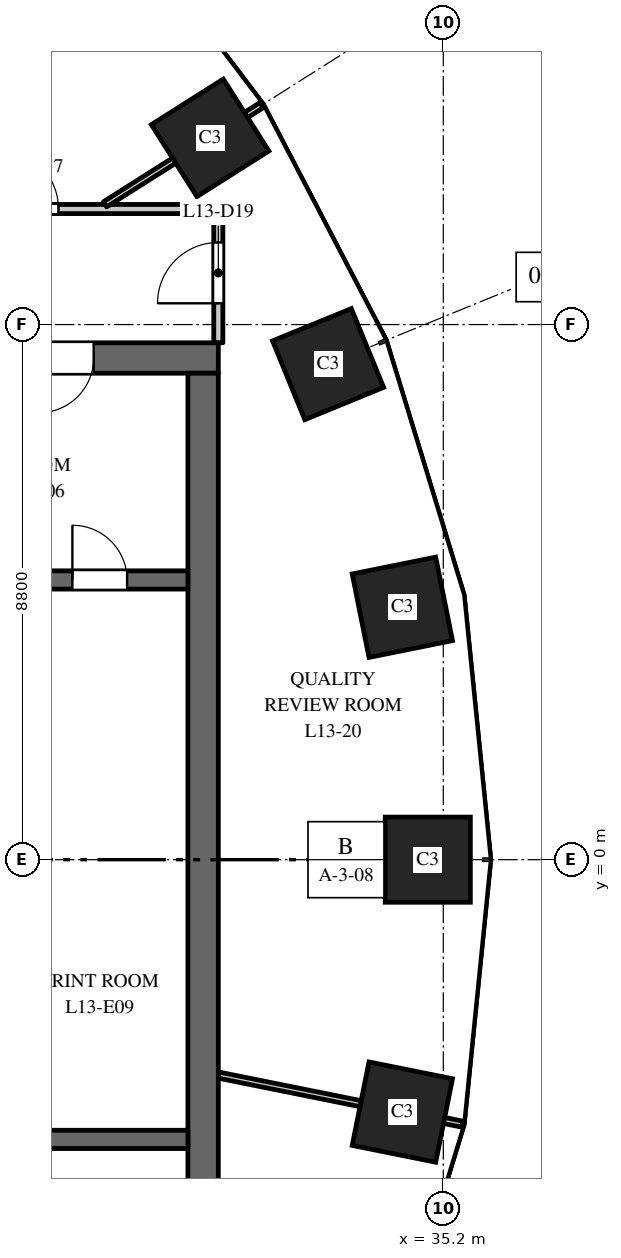
"""IFC4 building model, lengths in metres.
Left out: names, types, materials, properties, quantities, classifications, styles, units other than length and angle.
Written with IfcOpenShell. Run it as: python <this file> out.ifc"""

import sys

from ifc_helpers import new_model, si_unit, direction, frame, frame_2d, origin, origin_2d, place, context, subcontext, project, spatial, rectangle, extrude, element, fill, save


model = new_model("IFC4")
c1 = context("Model", 3, precision=1e-05, world=origin(), true_north=direction((0.0, 1.0)))
c2 = subcontext(c1, "Body", "Model", "MODEL_VIEW")
j1 = project(units=[si_unit("LENGTHUNIT", "METRE"), si_unit("PLANEANGLEUNIT", "RADIAN")], contexts=[c1])
p1 = place(None, origin())
s1 = spatial("IfcSite", under=j1, at=p1, CompositionType="ELEMENT")
p2 = place(p1, origin())
s2 = spatial("IfcBuilding", under=s1, at=p2, CompositionType="ELEMENT")
p3 = place(p2, frame((0.0, 0.0, 62.5)))
s3 = spatial("IfcBuildingStorey", under=s2, at=p3, CompositionType="ELEMENT", Elevation=62.5)
for number, where, z_axis, x_axis in (
    (1, (34.945, 0.0, 0.0), (0.0, 0.0, 1.0), (0.0, 1.0, 0.0)),
    (2, (34.527, 4.151, 0.0), (0.0, 0.0, 1.0), (-0.197, 0.98, 0.0)),
    (3, (33.305, 8.149, 0.0), (0.0, 0.0, 1.0), (-0.379, 0.925, 0.0)),
    (4, (31.365, 11.871, 0.0), (0.0, 0.0, 1.0), (-0.535, 0.845, 0.0)),
    (5, (34.527, -4.151, 0.0), (0.0, 0.0, 1.0), (0.197, 0.98, 0.0)),
):
    element("IfcColumn", number, at=place(p3, frame(where, z_axis=z_axis, x_axis=x_axis)), inside=s3, PredefinedType="COLUMN", context=c2, shape_type="SweptSolid", body=[
        extrude(rectangle(XDim=1.4, YDim=1.4, at=origin_2d()), origin(), (0.0, 0.0, 1.0), 4.0),
    ])
p4 = place(p3, frame((16.5, 8.25, 0.0), z_axis=(0.0, 0.0, 1.0), x_axis=(1.0, 0.0, 0.0)))
e6 = element("IfcWall", 6, at=p4, inside=s3, PredefinedType="SHEAR", context=c2, shape_type="SweptSolid", body=[
    extrude(rectangle(XDim=15.0, YDim=0.5, at=frame_2d((7.5, 0.0))), origin(), (0.0, 0.0, 1.0), 3.7),
])
p5 = place(p4, frame((6.9, 0.0, 0.0)))
e7 = element("IfcOpeningElement", 7, at=p5, cuts=e6, PredefinedType="OPENING", context=c2, shape_type="SweptSolid", body=[
    extrude(rectangle(XDim=1.2, YDim=2.1, at=frame_2d((0.6, 1.05))), frame((0.0, 0.26, 0.0), z_axis=(0.0, -1.0, 0.0), x_axis=(1.0, 0.0, 0.0)), (0.0, 0.0, 1.0), 0.52),
])
p6 = place(p4, frame((12.05, 0.0, 0.0)))
e8 = element("IfcOpeningElement", 8, at=p6, cuts=e6, PredefinedType="OPENING", context=c2, shape_type="SweptSolid", body=[
    extrude(rectangle(XDim=0.9, YDim=2.1, at=frame_2d((0.45, 1.05))), frame((0.0, 0.26, 0.0), z_axis=(0.0, -1.0, 0.0), x_axis=(1.0, 0.0, 0.0)), (0.0, 0.0, 1.0), 0.52),
])
p7 = place(p3, frame((31.25, -8.0, 0.0), z_axis=(0.0, 0.0, 1.0), x_axis=(0.0, 1.0, 0.0)))
e9 = element("IfcWall", 9, at=p7, inside=s3, PredefinedType="SHEAR", context=c2, shape_type="SweptSolid", body=[
    extrude(rectangle(XDim=16.0, YDim=0.5, at=frame_2d((8.0, 0.0))), origin(), (0.0, 0.0, 1.0), 3.7),
])
p8 = place(p3, frame((24.9, 4.6, 0.0), z_axis=(0.0, 0.0, 1.0), x_axis=(1.0, 0.0, 0.0)))
e10 = element("IfcWall", 10, at=p8, inside=s3, PredefinedType="SHEAR", context=c2, shape_type="SweptSolid", body=[
    extrude(rectangle(XDim=6.1, YDim=0.3, at=frame_2d((3.05, 0.0))), origin(), (0.0, 0.0, 1.0), 3.7),
])
p9 = place(p8, frame((4.2, 0.0, 0.0)))
e11 = element("IfcOpeningElement", 11, at=p9, cuts=e10, PredefinedType="OPENING", context=c2, shape_type="SweptSolid", body=[
    extrude(rectangle(XDim=0.9, YDim=2.1, at=frame_2d((0.45, 1.05))), frame((0.0, 0.16, 0.0), z_axis=(0.0, -1.0, 0.0), x_axis=(1.0, 0.0, 0.0)), (0.0, 0.0, 1.0), 0.32),
])
p10 = place(p3, frame((24.9, -4.6, 0.0), z_axis=(0.0, 0.0, 1.0), x_axis=(1.0, 0.0, 0.0)))
e12 = element("IfcWall", 12, at=p10, inside=s3, PredefinedType="SHEAR", context=c2, shape_type="SweptSolid", body=[
    extrude(rectangle(XDim=6.1, YDim=0.3, at=frame_2d((3.05, 0.0))), origin(), (0.0, 0.0, 1.0), 3.7),
])
p11 = place(p3, frame((16.5, 10.7, 0.0), z_axis=(0.0, 0.0, 1.0), x_axis=(1.0, 0.0, 0.0)))
e13 = element("IfcWall", 13, at=p11, inside=s3, PredefinedType="PARTITIONING", context=c2, shape_type="SweptSolid", body=[
    extrude(rectangle(XDim=15.0, YDim=0.15, at=frame_2d((7.5, 0.0))), origin(), (0.0, 0.0, 1.0), 2.75),
])
p12 = place(p11, frame((11.371, 0.0, 0.0)))
e14 = element("IfcOpeningElement", 14, at=p12, cuts=e13, PredefinedType="OPENING", context=c2, shape_type="SweptSolid", body=[
    extrude(rectangle(XDim=1.0, YDim=2.1, at=frame_2d((0.5, 1.05))), frame((0.0, 0.085, 0.0), z_axis=(0.0, -1.0, 0.0), x_axis=(1.0, 0.0, 0.0)), (0.0, 0.0, 1.0), 0.17),
])
p13 = place(p3, frame((29.637, 10.777, 0.0), z_axis=(0.0, 0.0, 1.0), x_axis=(0.844810627195, 0.535065420467, 0.0)))
e15 = element("IfcWall", 15, at=p13, inside=s3, PredefinedType="PARTITIONING", context=c2, shape_type="SweptSolid", body=[
    extrude(rectangle(XDim=3.048, YDim=0.1, at=frame_2d((1.524, 0.0))), origin(), (0.0, 0.0, 1.0), 2.85),
])
p14 = place(p3, frame((31.5, -3.542, 0.0), z_axis=(0.0, 0.0, 1.0), x_axis=(0.980357474535, -0.197228857227, 0.0)))
e16 = element("IfcWall", 16, at=p14, inside=s3, PredefinedType="PARTITIONING", context=c2, shape_type="SweptSolid", body=[
    extrude(rectangle(XDim=4.092, YDim=0.1, at=frame_2d((2.046, 0.0))), origin(), (0.0, 0.0, 1.0), 2.85),
])
p15 = place(p3, frame((31.5, 8.5, 0.0), z_axis=(0.0, 0.0, 1.0), x_axis=(0.0, 1.0, 0.0)))
e17 = element("IfcWall", 17, at=p15, inside=s3, PredefinedType="PARTITIONING", context=c2, shape_type="SweptSolid", body=[
    extrude(rectangle(XDim=2.2, YDim=0.15, at=frame_2d((1.1, 0.0))), origin(), (0.0, 0.0, 1.0), 2.85),
])
p16 = place(p15, frame((0.65, 0.0, 0.0)))
e18 = element("IfcOpeningElement", 18, at=p16, cuts=e17, PredefinedType="OPENING", context=c2, shape_type="SweptSolid", body=[
    extrude(rectangle(XDim=1.0, YDim=2.1, at=frame_2d((0.5, 1.05))), frame((0.0, 0.085, 0.0), z_axis=(0.0, -1.0, 0.0), x_axis=(1.0, 0.0, 0.0)), (0.0, 0.0, 1.0), 0.17),
])
p17 = place(p6, origin())
e19 = element("IfcDoor", 19, at=p17, inside=s3, OperationType="SINGLE_SWING_LEFT", PredefinedType="DOOR", context=c2, shape_type="SweptSolid", body=[
    extrude(rectangle(XDim=0.9, YDim=2.1, at=frame_2d((0.45, 1.05))), frame((0.0, 0.025, 0.0), z_axis=(0.0, -1.0, 0.0), x_axis=(1.0, 0.0, 0.0)), (0.0, 0.0, 1.0), 0.05),
])
fill(e8, e19)
p18 = place(p9, origin())
e20 = element("IfcDoor", 20, at=p18, inside=s3, OperationType="SINGLE_SWING_RIGHT", PredefinedType="DOOR", context=c2, shape_type="SweptSolid", body=[
    extrude(rectangle(XDim=0.9, YDim=2.1, at=frame_2d((0.45, 1.05))), frame((0.0, 0.025, 0.0), z_axis=(0.0, -1.0, 0.0), x_axis=(1.0, 0.0, 0.0)), (0.0, 0.0, 1.0), 0.05),
])
fill(e11, e20)
p19 = place(p12, origin())
e21 = element("IfcDoor", 21, at=p19, inside=s3, OperationType="SINGLE_SWING_LEFT", PredefinedType="DOOR", context=c2, shape_type="SweptSolid", body=[
    extrude(rectangle(XDim=1.0, YDim=2.1, at=frame_2d((0.5, 1.05))), frame((0.0, 0.025, 0.0), z_axis=(0.0, -1.0, 0.0), x_axis=(1.0, 0.0, 0.0)), (0.0, 0.0, 1.0), 0.05),
])
fill(e14, e21)
p20 = place(p16, origin())
e22 = element("IfcDoor", 22, at=p20, inside=s3, OperationType="SINGLE_SWING_LEFT", PredefinedType="DOOR", context=c2, shape_type="SweptSolid", body=[
    extrude(rectangle(XDim=1.0, YDim=2.1, at=frame_2d((0.5, 1.05))), frame((0.0, 0.025, 0.0), z_axis=(0.0, -1.0, 0.0), x_axis=(1.0, 0.0, 0.0)), (0.0, 0.0, 1.0), 0.05),
])
fill(e18, e22)
save(model, sys.argv[1])
